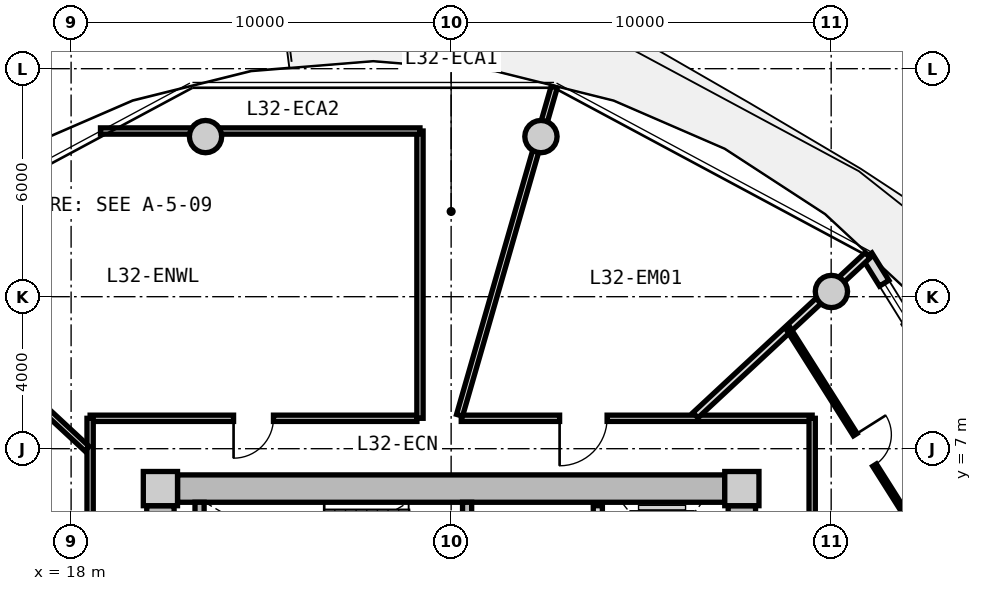
"""IFC4 building model, lengths in metres.
Left out: names, types, materials, properties, quantities, classifications, styles, units other than length and angle.
Written with IfcOpenShell. Run it as: python <this file> out.ifc"""

import sys

from ifc_helpers import new_model, si_unit, direction, frame, frame_2d, origin, origin_2d, place, context, subcontext, project, spatial, rectangle, circle, extrude, source, transform, mapped, element, fill, save


model = new_model("IFC4")
c1 = context("Model", 3, precision=1e-05, world=origin(), true_north=direction((0.0, 1.0)))
c2 = subcontext(c1, "Body", "Model", "MODEL_VIEW")
j1 = project(units=[si_unit("LENGTHUNIT", "METRE"), si_unit("PLANEANGLEUNIT", "RADIAN")], contexts=[c1])
p1 = place(None, origin())
s1 = spatial("IfcSite", under=j1, at=p1, CompositionType="ELEMENT")
p2 = place(p1, origin())
s2 = spatial("IfcBuilding", under=s1, at=p2, CompositionType="ELEMENT")
p3 = place(p2, frame((0.0, 0.0, 105.4)))
s3 = spatial("IfcBuildingStorey", under=s2, at=p3, CompositionType="ELEMENT", Elevation=105.4)
m1 = source(origin(), c2, "Body", "SweptSolid", [
    extrude(rectangle(XDim=0.9, YDim=0.9, at=origin_2d()), origin(), (0.0, 0.0, 1.0), 3.05),
])
for number, where, z_axis, x_axis in (
    (1, (35.65, 5.95, 0.0), (0.0, 0.0, 1.0), (1.0, 0.0, 0.0)),
    (2, (20.35, 5.95, 0.0), (0.0, 0.0, 1.0), (1.0, 0.0, 0.0)),
):
    element("IfcColumn", number, at=place(p3, frame(where, z_axis=z_axis, x_axis=x_axis)), inside=s3, PredefinedType="COLUMN", context=c2, shape_type="MappedRepresentation", body=[
        mapped(m1, transform((0.0, 0.0, 0.0), x_axis=(1.0, 0.0, 0.0), y_axis=(0.0, 1.0, 0.0), z_axis=(0.0, 0.0, 1.0), scale=1.0)),
    ])
m2 = source(origin(), c2, "Body", "SweptSolid", [
    extrude(rectangle(XDim=14.4, YDim=0.72, at=frame_2d((7.2, 0.0))), origin(), (0.0, 0.0, 1.0), 2.79),
])
p4 = place(p3, frame((20.8, 5.95, 0.0), z_axis=(0.0, 0.0, 1.0), x_axis=(1.0, 0.0, 0.0)))
e3 = element("IfcWall", 3, at=p4, inside=s3, PredefinedType="SHEAR", context=c2, shape_type="MappedRepresentation", body=[
    mapped(m2, transform((0.0, 0.0, 0.0), x_axis=(1.0, 0.0, 0.0), y_axis=(0.0, 1.0, 0.0), z_axis=(0.0, 0.0, 1.0), scale=1.0)),
])
m3 = source(origin(), c2, "Body", "SweptSolid", [
    extrude(rectangle(XDim=11.0, YDim=0.72, at=frame_2d((5.5, 0.0))), origin(), (0.0, 0.0, 1.0), 2.79),
])
p5 = place(p3, frame((20.35, -5.5, 0.0), z_axis=(0.0, 0.0, 1.0), x_axis=(0.0, 1.0, 0.0)))
e4 = element("IfcWall", 4, at=p5, inside=s3, PredefinedType="SHEAR", context=c2, shape_type="MappedRepresentation", body=[
    mapped(m3, transform((0.0, 0.0, 0.0), x_axis=(1.0, 0.0, 0.0), y_axis=(0.0, 1.0, 0.0), z_axis=(0.0, 0.0, 1.0), scale=1.0)),
])
p6 = place(p5, frame((3.8, 0.0, 0.0)))
e5 = element("IfcOpeningElement", 5, at=p6, cuts=e4, PredefinedType="OPENING", context=c2, shape_type="SweptSolid", body=[
    extrude(rectangle(XDim=1.2, YDim=2.15, at=frame_2d((0.6, 1.075))), frame((0.0, 0.37, 0.0), z_axis=(0.0, -1.0, 0.0), x_axis=(1.0, 0.0, 0.0)), (0.0, 0.0, 1.0), 0.74),
])
p7 = place(p3, frame((35.65, 5.5, 0.0), z_axis=(0.0, 0.0, 1.0), x_axis=(0.0, -1.0, 0.0)))
e6 = element("IfcWall", 6, at=p7, inside=s3, PredefinedType="SHEAR", context=c2, shape_type="MappedRepresentation", body=[
    mapped(m3, transform((0.0, 0.0, 0.0), x_axis=(1.0, 0.0, 0.0), y_axis=(0.0, 1.0, 0.0), z_axis=(0.0, 0.0, 1.0), scale=1.0)),
])
p8 = place(p7, frame((5.65, 0.0, 0.0)))
e7 = element("IfcOpeningElement", 7, at=p8, cuts=e6, PredefinedType="OPENING", context=c2, shape_type="SweptSolid", body=[
    extrude(rectangle(XDim=1.2, YDim=2.15, at=frame_2d((0.6, 1.075))), frame((0.0, 0.37, 0.0), z_axis=(0.0, -1.0, 0.0), x_axis=(1.0, 0.0, 0.0)), (0.0, 0.0, 1.0), 0.74),
])
m4 = source(origin(), c2, "Body", "SweptSolid", [
    extrude(circle(Radius=0.425, at=origin_2d()), origin(), (0.0, 0.0, 1.0), 3.05),
])
for number, where, z_axis, x_axis in (
    (8, (38.006, 11.137, 0.0), (0.0, 0.0, 1.0), (1.0, 0.0, 0.0)),
    (9, (30.363, 15.213, 0.0), (0.0, 0.0, 1.0), (1.0, 0.0, 0.0)),
    (10, (21.537, 15.213, 0.0), (0.0, 0.0, 1.0), (1.0, 0.0, 0.0)),
):
    element("IfcColumn", number, at=place(p3, frame(where, z_axis=z_axis, x_axis=x_axis)), inside=s3, PredefinedType="COLUMN", context=c2, shape_type="MappedRepresentation", body=[
        mapped(m4, transform((0.0, 0.0, 0.0), x_axis=(1.0, 0.0, 0.0), y_axis=(0.0, 1.0, 0.0), z_axis=(0.0, 0.0, 1.0), scale=1.0)),
    ])
m5 = source(origin(), c2, "Body", "SweptSolid", [
    extrude(rectangle(XDim=9.014, YDim=0.29, at=frame_2d((4.507, 0.0))), origin(), (0.0, 0.0, 1.0), 2.79),
])
p9 = place(p3, frame((38.947, 12.077, 0.0), z_axis=(0.0, 0.0, 1.0), x_axis=(0.527732945084, -0.849410347637, 0.0)))
e11 = element("IfcWall", 11, at=p9, inside=s3, PredefinedType="SOLIDWALL", context=c2, shape_type="MappedRepresentation", body=[
    mapped(m5, transform((0.0, 0.0, 0.0), x_axis=(1.0, 0.0, 0.0), y_axis=(0.0, 1.0, 0.0), z_axis=(0.0, 0.0, 1.0), scale=1.0)),
])
p10 = place(p9, frame((6.9, 0.0, 0.0)))
e12 = element("IfcOpeningElement", 12, at=p10, cuts=e11, PredefinedType="OPENING", context=c2, shape_type="SweptSolid", body=[
    extrude(rectangle(XDim=1.15, YDim=2.25, at=frame_2d((0.575, 1.125))), frame((0.0, 0.155, 0.0), z_axis=(0.0, -1.0, 0.0), x_axis=(1.0, 0.0, 0.0)), (0.0, 0.0, 1.0), 0.31),
])
p11 = place(p9, frame((0.85, 0.0, 0.85)))
e13 = element("IfcOpeningElement", 13, at=p11, cuts=e11, PredefinedType="OPENING", context=c2, shape_type="SweptSolid", body=[
    extrude(rectangle(XDim=1.2, YDim=1.5, at=frame_2d((0.6, 0.75))), frame((0.0, 0.155, 0.0), z_axis=(0.0, -1.0, 0.0), x_axis=(1.0, 0.0, 0.0)), (0.0, 0.0, 1.0), 0.31),
])
m6 = source(origin(), c2, "Body", "SweptSolid", [
    extrude(rectangle(XDim=3.14, YDim=0.24, at=frame_2d((1.57, 0.0))), origin(), (0.0, 0.0, 1.0), 2.79),
])
p12 = place(p3, frame((21.38, 2.45, 0.0), z_axis=(0.0, 0.0, 1.0), x_axis=(0.0, 1.0, 0.0)))
e14 = element("IfcWall", 14, at=p12, inside=s3, PredefinedType="PARTITIONING", context=c2, shape_type="MappedRepresentation", body=[
    mapped(m6, transform((0.0, 0.0, 0.0), x_axis=(1.0, 0.0, 0.0), y_axis=(0.0, 1.0, 0.0), z_axis=(0.0, 0.0, 1.0), scale=1.0)),
])
p13 = place(p3, frame((28.42, 2.45, 0.0), z_axis=(0.0, 0.0, 1.0), x_axis=(0.0, 1.0, 0.0)))
e15 = element("IfcWall", 15, at=p13, inside=s3, PredefinedType="PARTITIONING", context=c2, shape_type="MappedRepresentation", body=[
    mapped(m6, transform((0.0, 0.0, 0.0), x_axis=(1.0, 0.0, 0.0), y_axis=(0.0, 1.0, 0.0), z_axis=(0.0, 0.0, 1.0), scale=1.0)),
])
p14 = place(p13, frame((0.55, 0.0, 0.0)))
e16 = element("IfcOpeningElement", 16, at=p14, cuts=e15, PredefinedType="OPENING", context=c2, shape_type="SweptSolid", body=[
    extrude(rectangle(XDim=1.1, YDim=2.15, at=frame_2d((0.55, 1.075))), frame((0.0, 0.13, 0.0), z_axis=(0.0, -1.0, 0.0), x_axis=(1.0, 0.0, 0.0)), (0.0, 0.0, 1.0), 0.26),
])
m7 = source(origin(), c2, "Body", "SweptSolid", [
    extrude(rectangle(XDim=5.0, YDim=0.24, at=frame_2d((2.5, 0.0))), origin(), (0.0, 0.0, 1.0), 2.775),
])
p15 = place(p3, frame((31.86, 0.5, 0.0), z_axis=(0.0, 0.0, 1.0), x_axis=(0.0, 1.0, 0.0)))
e17 = element("IfcWall", 17, at=p15, inside=s3, PredefinedType="PARTITIONING", context=c2, shape_type="MappedRepresentation", body=[
    mapped(m7, transform((0.0, 0.0, 0.0), x_axis=(1.0, 0.0, 0.0), y_axis=(0.0, 1.0, 0.0), z_axis=(0.0, 0.0, 1.0), scale=1.0)),
])
p16 = place(p15, frame((3.05, 0.0, 0.0)))
e18 = element("IfcOpeningElement", 18, at=p16, cuts=e17, PredefinedType="OPENING", context=c2, shape_type="SweptSolid", body=[
    extrude(rectangle(XDim=1.3, YDim=2.2, at=frame_2d((0.65, 1.1))), frame((0.0, 0.13, 0.0), z_axis=(0.0, -1.0, 0.0), x_axis=(1.0, 0.0, 0.0)), (0.0, 0.0, 1.0), 0.26),
])
p17 = place(p15, frame((0.55, 0.0, 0.0)))
e19 = element("IfcOpeningElement", 19, at=p17, cuts=e17, PredefinedType="OPENING", context=c2, shape_type="SweptSolid", body=[
    extrude(rectangle(XDim=1.3, YDim=2.2, at=frame_2d((0.65, 1.1))), frame((0.0, 0.13, 0.0), z_axis=(0.0, -1.0, 0.0), x_axis=(1.0, 0.0, 0.0)), (0.0, 0.0, 1.0), 0.26),
])
m8 = source(origin(), c2, "Body", "SweptSolid", [
    extrude(rectangle(XDim=8.6, YDim=0.165, at=frame_2d((4.3, 0.0))), origin(), (0.0, 0.0, 1.0), 2.775),
])
p18 = place(p3, frame((18.5, 7.8, 0.0), z_axis=(0.0, 0.0, 1.0), x_axis=(1.0, 0.0, 0.0)))
e20 = element("IfcWall", 20, at=p18, inside=s3, PredefinedType="PARTITIONING", context=c2, shape_type="MappedRepresentation", body=[
    mapped(m8, transform((0.0, 0.0, 0.0), x_axis=(1.0, 0.0, 0.0), y_axis=(0.0, 1.0, 0.0), z_axis=(0.0, 0.0, 1.0), scale=1.0)),
])
p19 = place(p18, frame((3.775, 0.0, 0.0)))
e21 = element("IfcOpeningElement", 21, at=p19, cuts=e20, PredefinedType="OPENING", context=c2, shape_type="SweptSolid", body=[
    extrude(rectangle(XDim=1.05, YDim=2.15, at=frame_2d((0.525, 1.075))), frame((0.0, 0.093, 0.0), z_axis=(0.0, -1.0, 0.0), x_axis=(1.0, 0.0, 0.0)), (0.0, 0.0, 1.0), 0.185),
])
m9 = source(origin(), c2, "Body", "SweptSolid", [
    extrude(rectangle(XDim=9.234, YDim=0.165, at=frame_2d((4.617, 0.0))), origin(), (0.0, 0.0, 1.0), 2.775),
])
p20 = place(p3, frame((28.266, 7.8, 0.0), z_axis=(0.0, 0.0, 1.0), x_axis=(1.0, 0.0, 0.0)))
e22 = element("IfcWall", 22, at=p20, inside=s3, PredefinedType="PARTITIONING", context=c2, shape_type="MappedRepresentation", body=[
    mapped(m9, transform((0.0, 0.0, 0.0), x_axis=(1.0, 0.0, 0.0), y_axis=(0.0, 1.0, 0.0), z_axis=(0.0, 0.0, 1.0), scale=1.0)),
])
p21 = place(p20, frame((2.588, 0.0, 0.0)))
e23 = element("IfcOpeningElement", 23, at=p21, cuts=e22, PredefinedType="OPENING", context=c2, shape_type="SweptSolid", body=[
    extrude(rectangle(XDim=1.25, YDim=2.2, at=frame_2d((0.625, 1.1))), frame((0.0, 0.093, 0.0), z_axis=(0.0, -1.0, 0.0), x_axis=(1.0, 0.0, 0.0)), (0.0, 0.0, 1.0), 0.185),
])
m10 = source(origin(), c2, "Body", "SweptSolid", [
    extrude(rectangle(XDim=15.6, YDim=0.165, at=frame_2d((7.8, 0.0))), origin(), (0.0, 0.0, 1.0), 2.775),
])
p22 = place(p3, frame((18.5, -7.8, 0.0), z_axis=(0.0, 0.0, 1.0), x_axis=(0.0, 1.0, 0.0)))
e24 = element("IfcWall", 24, at=p22, inside=s3, PredefinedType="PARTITIONING", context=c2, shape_type="MappedRepresentation", body=[
    mapped(m10, transform((0.0, 0.0, 0.0), x_axis=(1.0, 0.0, 0.0), y_axis=(0.0, 1.0, 0.0), z_axis=(0.0, 0.0, 1.0), scale=1.0)),
])
p23 = place(p22, frame((10.383, 0.0, 0.0)))
e25 = element("IfcOpeningElement", 25, at=p23, cuts=e24, PredefinedType="OPENING", context=c2, shape_type="SweptSolid", body=[
    extrude(rectangle(XDim=1.05, YDim=2.15, at=frame_2d((0.525, 1.075))), frame((0.0, 0.093, 0.0), z_axis=(0.0, -1.0, 0.0), x_axis=(1.0, 0.0, 0.0)), (0.0, 0.0, 1.0), 0.185),
])
p24 = place(p22, frame((6.419, 0.0, 0.0)))
e26 = element("IfcOpeningElement", 26, at=p24, cuts=e24, PredefinedType="OPENING", context=c2, shape_type="SweptSolid", body=[
    extrude(rectangle(XDim=1.05, YDim=2.15, at=frame_2d((0.525, 1.075))), frame((0.0, 0.093, 0.0), z_axis=(0.0, -1.0, 0.0), x_axis=(1.0, 0.0, 0.0)), (0.0, 0.0, 1.0), 0.185),
])
p25 = place(p22, frame((1.821, 0.0, 0.0)))
e27 = element("IfcOpeningElement", 27, at=p25, cuts=e24, PredefinedType="OPENING", context=c2, shape_type="SweptSolid", body=[
    extrude(rectangle(XDim=1.05, YDim=2.15, at=frame_2d((0.525, 1.075))), frame((0.0, 0.093, 0.0), z_axis=(0.0, -1.0, 0.0), x_axis=(1.0, 0.0, 0.0)), (0.0, 0.0, 1.0), 0.185),
])
p26 = place(p3, frame((37.5, 7.8, 0.0), z_axis=(0.0, 0.0, 1.0), x_axis=(0.0, -1.0, 0.0)))
e28 = element("IfcWall", 28, at=p26, inside=s3, PredefinedType="PARTITIONING", context=c2, shape_type="MappedRepresentation", body=[
    mapped(m10, transform((0.0, 0.0, 0.0), x_axis=(1.0, 0.0, 0.0), y_axis=(0.0, 1.0, 0.0), z_axis=(0.0, 0.0, 1.0), scale=1.0)),
])
p27 = place(p26, frame((6.87, 0.0, 0.0)))
e29 = element("IfcOpeningElement", 29, at=p27, cuts=e28, PredefinedType="OPENING", context=c2, shape_type="SweptSolid", body=[
    extrude(rectangle(XDim=1.05, YDim=2.15, at=frame_2d((0.525, 1.075))), frame((0.0, 0.093, 0.0), z_axis=(0.0, -1.0, 0.0), x_axis=(1.0, 0.0, 0.0)), (0.0, 0.0, 1.0), 0.185),
])
m11 = source(origin(), c2, "Body", "SweptSolid", [
    extrude(rectangle(XDim=8.989, YDim=0.165, at=frame_2d((4.495, 0.0))), origin(), (0.0, 0.0, 1.0), 2.275),
])
p28 = place(p3, frame((28.222, 7.88, 0.0), z_axis=(0.0, 0.0, 1.0), x_axis=(0.27702323008, 0.960863221274, 0.0)))
e30 = element("IfcWall", 30, at=p28, inside=s3, PredefinedType="PARTITIONING", context=c2, shape_type="MappedRepresentation", body=[
    mapped(m11, transform((0.0, 0.0, 0.0), x_axis=(1.0, 0.0, 0.0), y_axis=(0.0, 1.0, 0.0), z_axis=(0.0, 0.0, 1.0), scale=1.0)),
])
m12 = source(origin(), c2, "Body", "SweptSolid", [
    extrude(rectangle(XDim=7.482, YDim=0.165, at=frame_2d((3.741, 0.0))), origin(), (0.0, 0.0, 1.0), 2.275),
])
p29 = place(p3, frame((18.42, 6.998, 0.0), z_axis=(0.0, 0.0, 1.0), x_axis=(-0.732508698043, 0.680757671489, 0.0)))
e31 = element("IfcWall", 31, at=p29, inside=s3, PredefinedType="PARTITIONING", context=c2, shape_type="MappedRepresentation", body=[
    mapped(m12, transform((0.0, 0.0, 0.0), x_axis=(1.0, 0.0, 0.0), y_axis=(0.0, 1.0, 0.0), z_axis=(0.0, 0.0, 1.0), scale=1.0)),
])
m13 = source(origin(), c2, "Body", "SweptSolid", [
    extrude(rectangle(XDim=7.56, YDim=0.165, at=frame_2d((3.78, 0.0))), origin(), (0.0, 0.0, 1.0), 2.775),
])
p30 = place(p3, frame((27.18, 7.8, 0.0), z_axis=(0.0, 0.0, 1.0), x_axis=(0.0, 1.0, 0.0)))
e32 = element("IfcWall", 32, at=p30, inside=s3, PredefinedType="PARTITIONING", context=c2, shape_type="MappedRepresentation", body=[
    mapped(m13, transform((0.0, 0.0, 0.0), x_axis=(1.0, 0.0, 0.0), y_axis=(0.0, 1.0, 0.0), z_axis=(0.0, 0.0, 1.0), scale=1.0)),
])
m14 = source(origin(), c2, "Body", "SweptSolid", [
    extrude(rectangle(XDim=8.407, YDim=0.165, at=frame_2d((4.204, 0.0))), origin(), (0.0, 0.0, 1.0), 2.275),
])
p31 = place(p3, frame((18.773, 15.36, 0.0), z_axis=(0.0, 0.0, 1.0), x_axis=(1.0, 0.0, 0.0)))
e33 = element("IfcWall", 33, at=p31, inside=s3, PredefinedType="PARTITIONING", context=c2, shape_type="MappedRepresentation", body=[
    mapped(m14, transform((0.0, 0.0, 0.0), x_axis=(1.0, 0.0, 0.0), y_axis=(0.0, 1.0, 0.0), z_axis=(0.0, 0.0, 1.0), scale=1.0)),
])
m15 = source(origin(), c2, "Body", "SweptSolid", [
    extrude(rectangle(XDim=4.735, YDim=0.14, at=frame_2d((2.368, 0.0))), origin(), (0.0, 0.0, 1.0), 2.775),
])
p32 = place(p3, frame((18.47, 4.368, 0.0), z_axis=(0.0, 0.0, 1.0), x_axis=(-0.863537576642, 0.504284496814, 0.0)))
e34 = element("IfcWall", 34, at=p32, inside=s3, PredefinedType="PARTITIONING", context=c2, shape_type="MappedRepresentation", body=[
    mapped(m15, transform((0.0, 0.0, 0.0), x_axis=(1.0, 0.0, 0.0), y_axis=(0.0, 1.0, 0.0), z_axis=(0.0, 0.0, 1.0), scale=1.0)),
])
p33 = place(p32, frame((1.908, 0.0, 0.0)))
e35 = element("IfcOpeningElement", 35, at=p33, cuts=e34, PredefinedType="OPENING", context=c2, shape_type="SweptSolid", body=[
    extrude(rectangle(XDim=0.92, YDim=2.1, at=frame_2d((0.46, 1.05))), frame((0.0, 0.08, 0.0), z_axis=(0.0, -1.0, 0.0), x_axis=(1.0, 0.0, 0.0)), (0.0, 0.0, 1.0), 0.16),
])
m16 = source(origin(), c2, "Body", "SweptSolid", [
    extrude(rectangle(XDim=6.187, YDim=0.19, at=frame_2d((3.093, 0.0))), origin(), (0.0, 0.0, 1.0), 2.415),
])
p34 = place(p3, frame((34.429, 7.88, 0.0), z_axis=(0.0, 0.0, 1.0), x_axis=(0.732501077882, 0.680765870841, 0.0)))
e36 = element("IfcWall", 36, at=p34, inside=s3, PredefinedType="PARTITIONING", context=c2, shape_type="MappedRepresentation", body=[
    mapped(m16, transform((0.0, 0.0, 0.0), x_axis=(1.0, 0.0, 0.0), y_axis=(0.0, 1.0, 0.0), z_axis=(0.0, 0.0, 1.0), scale=1.0)),
])
m17 = source(origin(), c2, "Body", "SweptSolid", [
    extrude(rectangle(XDim=7.618, YDim=0.115, at=frame_2d((3.809, 0.0))), origin(), (0.0, 0.0, 1.0), 2.775),
])
p35 = place(p3, frame((40.923, 3.749, 0.0), z_axis=(0.0, 0.0, 1.0), x_axis=(-0.534316104929, 0.845284744931, 0.0)))
e37 = element("IfcWall", 37, at=p35, inside=s3, PredefinedType="PARTITIONING", context=c2, shape_type="MappedRepresentation", body=[
    mapped(m17, transform((0.0, 0.0, 0.0), x_axis=(1.0, 0.0, 0.0), y_axis=(0.0, 1.0, 0.0), z_axis=(0.0, 0.0, 1.0), scale=1.0)),
])
p36 = place(p35, frame((3.334, 0.0, 0.0)))
e38 = element("IfcOpeningElement", 38, at=p36, cuts=e37, PredefinedType="OPENING", context=c2, shape_type="SweptSolid", body=[
    extrude(rectangle(XDim=0.95, YDim=2.1, at=frame_2d((0.475, 1.05))), frame((0.0, 0.067, 0.0), z_axis=(0.0, -1.0, 0.0), x_axis=(1.0, 0.0, 0.0)), (0.0, 0.0, 1.0), 0.135),
])
m18 = source(origin(), c2, "Body", "SweptSolid", [
    extrude(rectangle(XDim=1.2, YDim=1.5, at=frame_2d((0.6, 0.75))), frame((0.0, 0.03, 0.0), z_axis=(0.0, -1.0, 0.0), x_axis=(1.0, 0.0, 0.0)), (0.0, 0.0, 1.0), 0.06),
])
p37 = place(p11, origin())
e39 = element("IfcWindow", 39, at=p37, inside=s3, PartitioningType="SINGLE_PANEL", PredefinedType="WINDOW", context=c2, shape_type="MappedRepresentation", body=[
    mapped(m18, transform((0.0, 0.0, 0.0), x_axis=(1.0, 0.0, 0.0), y_axis=(0.0, 1.0, 0.0), z_axis=(0.0, 0.0, 1.0), scale=1.0)),
])
fill(e13, e39)
m19 = source(origin(), c2, "Body", "SweptSolid", [
    extrude(rectangle(XDim=1.05, YDim=2.15, at=frame_2d((0.525, 1.075))), frame((0.0, 0.025, 0.0), z_axis=(0.0, -1.0, 0.0), x_axis=(1.0, 0.0, 0.0)), (0.0, 0.0, 1.0), 0.05),
])
p38 = place(p19, frame((1.05, 0.0, 0.0), z_axis=(0.0, 0.0, 1.0), x_axis=(-1.0, 0.0, 0.0)))
e40 = element("IfcDoor", 40, at=p38, inside=s3, OperationType="SINGLE_SWING_RIGHT", PredefinedType="DOOR", context=c2, shape_type="MappedRepresentation", body=[
    mapped(m19, transform((0.0, 0.0, 0.0), x_axis=(1.0, 0.0, 0.0), y_axis=(0.0, 1.0, 0.0), z_axis=(0.0, 0.0, 1.0), scale=1.0)),
])
fill(e21, e40)
m20 = source(origin(), c2, "Body", "SweptSolid", [
    extrude(rectangle(XDim=0.95, YDim=2.1, at=frame_2d((0.475, 1.05))), frame((0.0, 0.025, 0.0), z_axis=(0.0, -1.0, 0.0), x_axis=(1.0, 0.0, 0.0)), (0.0, 0.0, 1.0), 0.05),
])
p39 = place(p36, frame((0.95, 0.0, 0.0), z_axis=(0.0, 0.0, 1.0), x_axis=(-1.0, 0.0, 0.0)))
e41 = element("IfcDoor", 41, at=p39, inside=s3, OperationType="SINGLE_SWING_LEFT", PredefinedType="DOOR", context=c2, shape_type="MappedRepresentation", body=[
    mapped(m20, transform((0.0, 0.0, 0.0), x_axis=(1.0, 0.0, 0.0), y_axis=(0.0, 1.0, 0.0), z_axis=(0.0, 0.0, 1.0), scale=1.0)),
])
fill(e38, e41)
m21 = source(origin(), c2, "Body", "SweptSolid", [
    extrude(rectangle(XDim=1.25, YDim=2.2, at=frame_2d((0.625, 1.1))), frame((0.0, 0.025, 0.0), z_axis=(0.0, -1.0, 0.0), x_axis=(1.0, 0.0, 0.0)), (0.0, 0.0, 1.0), 0.05),
])
p40 = place(p21, frame((1.25, 0.0, 0.0), z_axis=(0.0, 0.0, 1.0), x_axis=(-1.0, 0.0, 0.0)))
e42 = element("IfcDoor", 42, at=p40, inside=s3, OperationType="SINGLE_SWING_RIGHT", PredefinedType="DOOR", context=c2, shape_type="MappedRepresentation", body=[
    mapped(m21, transform((0.0, 0.0, 0.0), x_axis=(1.0, 0.0, 0.0), y_axis=(0.0, 1.0, 0.0), z_axis=(0.0, 0.0, 1.0), scale=1.0)),
])
fill(e23, e42)
save(model, sys.argv[1])
